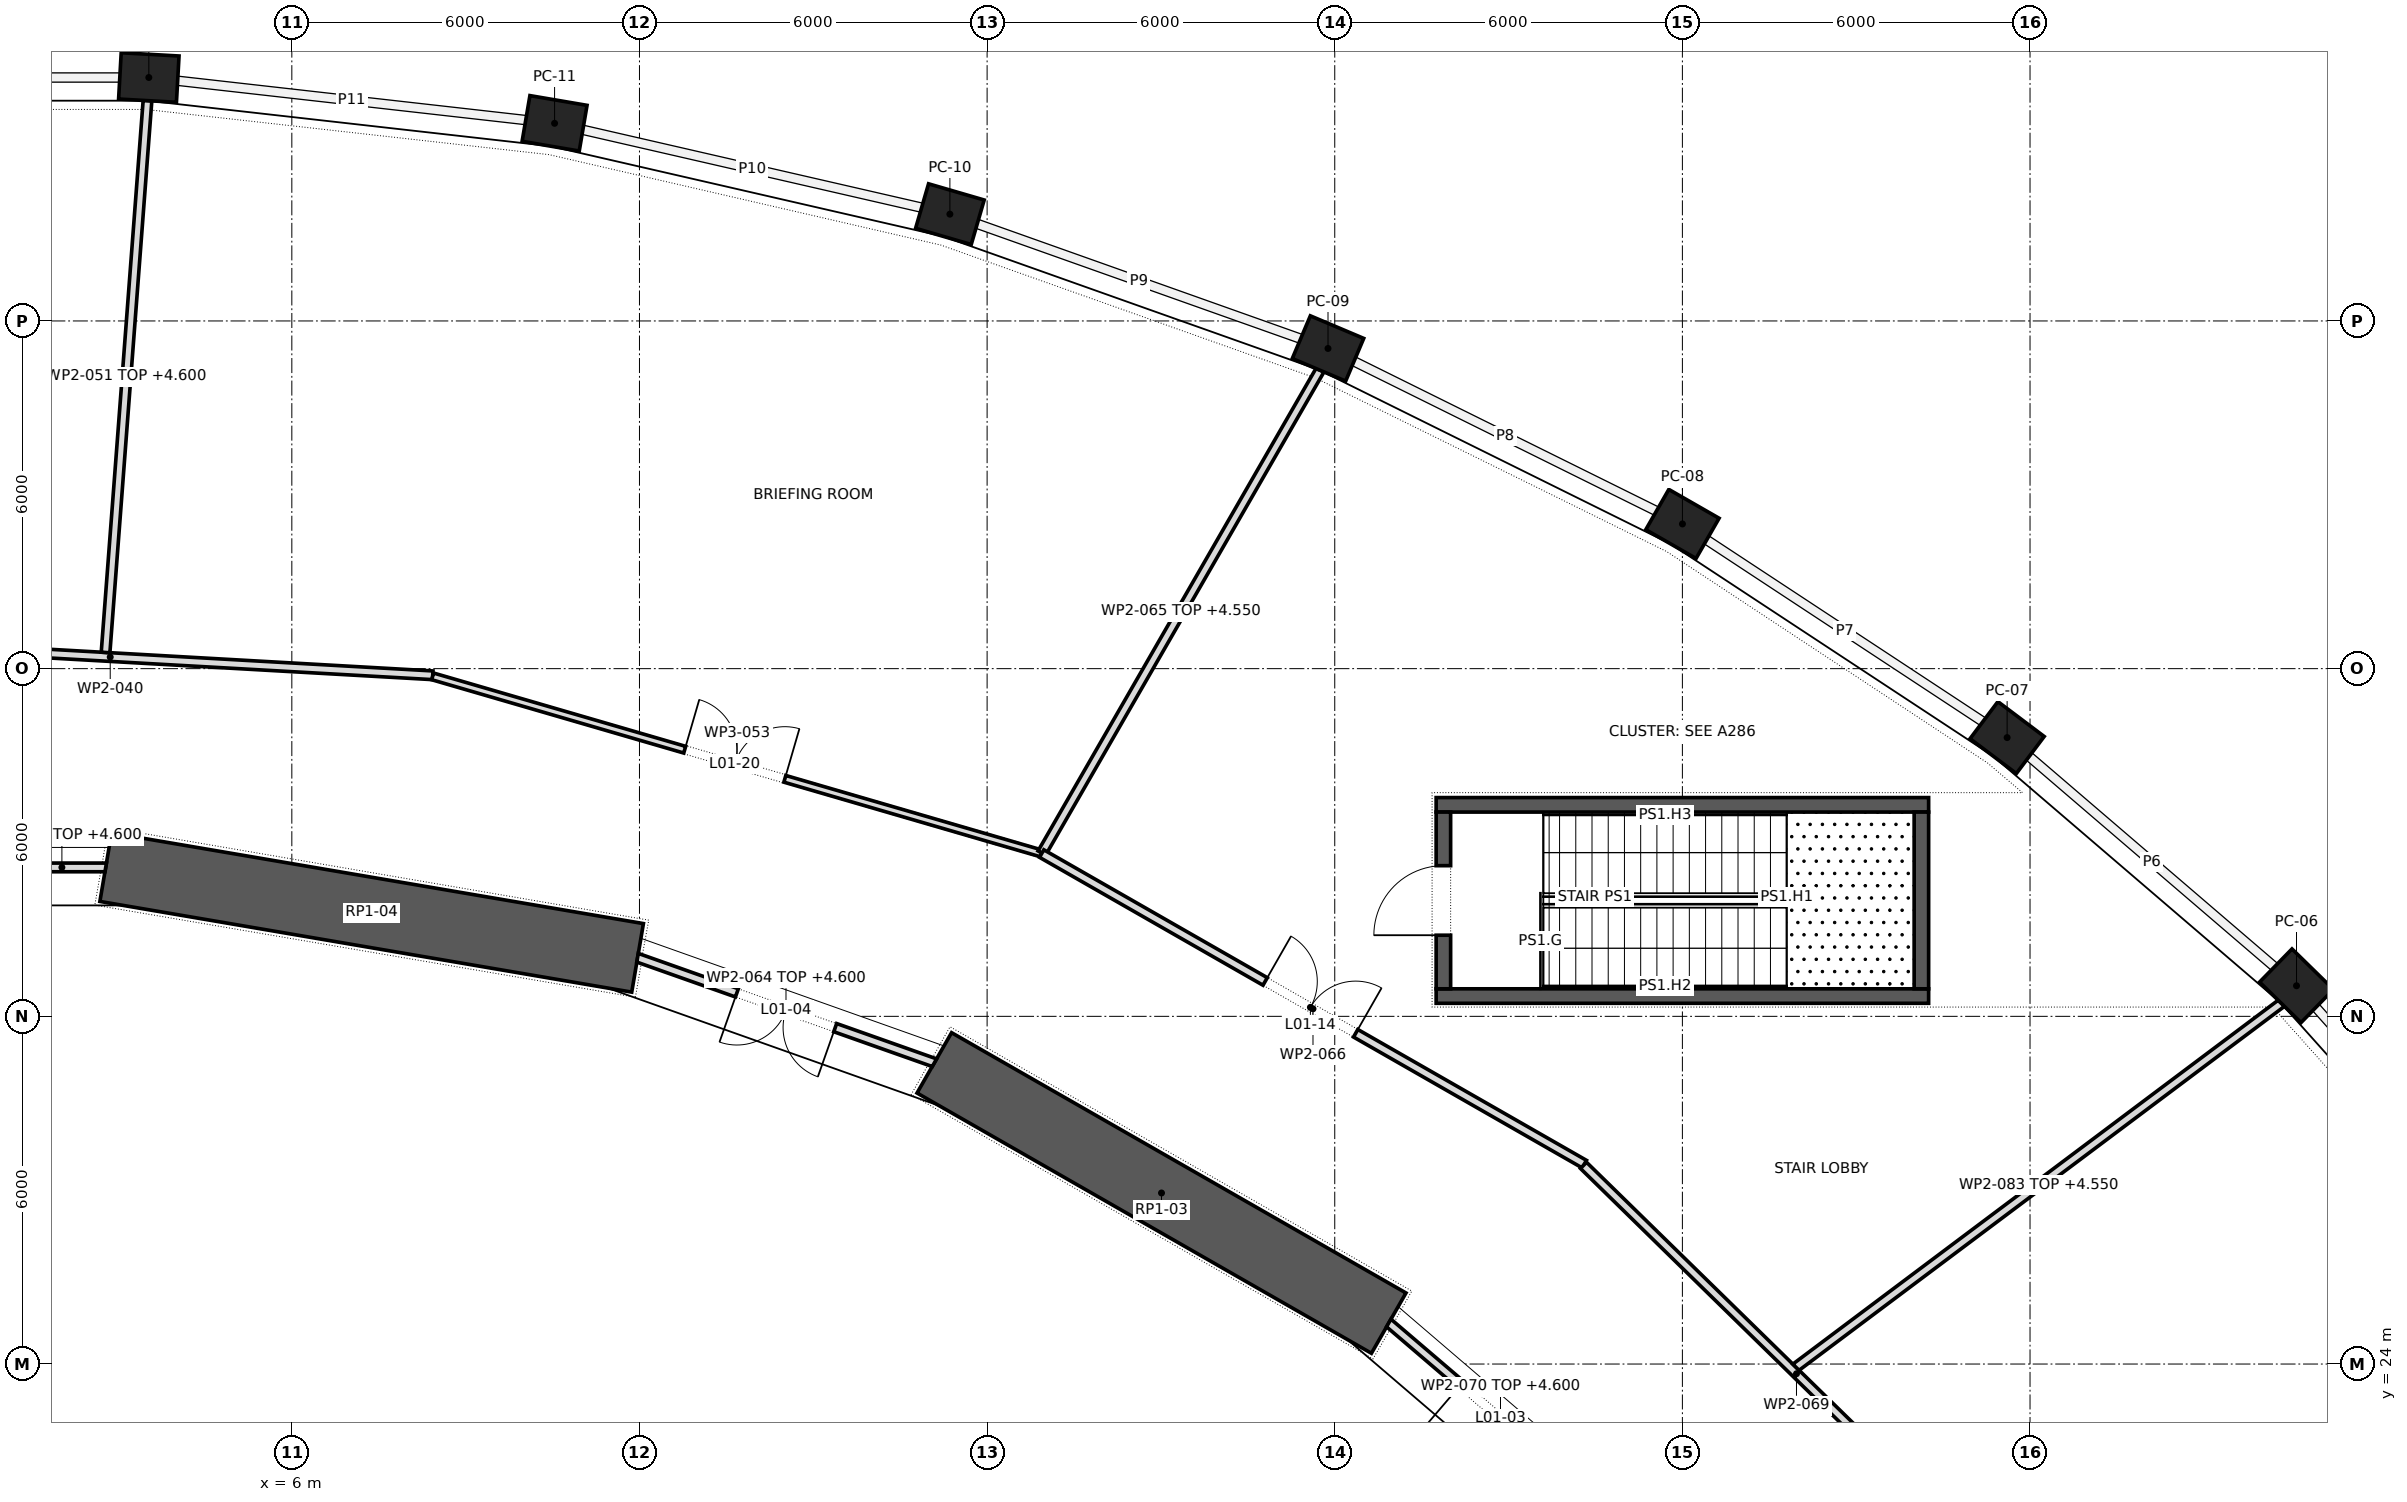
"""IFC4 building model, lengths in metres.
Left out: names, types, materials, properties, quantities, classifications, styles, units other than length and angle.
Written with IfcOpenShell. Run it as: python <this file> out.ifc"""

import sys

from ifc_helpers import new_model, si_unit, direction, frame, frame_2d, origin, origin_2d, place, context, subcontext, project, spatial, polyline, rectangle, outline, extrude, element, fill, save


model = new_model("IFC4")
c1 = context("Model", 3, precision=1e-05, world=origin(), true_north=direction((0.0, 1.0)))
c2 = subcontext(c1, "Body", "Model", "MODEL_VIEW")
j1 = project(units=[si_unit("LENGTHUNIT", "METRE"), si_unit("PLANEANGLEUNIT", "RADIAN")], contexts=[c1])
p1 = place(None, origin())
s1 = spatial("IfcSite", under=j1, at=p1, CompositionType="ELEMENT")
p2 = place(p1, origin())
s2 = spatial("IfcBuilding", under=s1, at=p2, CompositionType="ELEMENT")
p3 = place(p2, frame((0.0, 0.0, 7.0)))
s3 = spatial("IfcBuildingStorey", under=s2, at=p3, CompositionType="ELEMENT", Elevation=7.0)
for number, where, z_axis, x_axis in (
    (1, (40.599, 30.528, 0.0), (0.0, 0.0, 1.0), (-0.715, 0.699, 0.0)),
    (2, (35.605, 34.81, 0.0), (0.0, 0.0, 1.0), (-0.799, 0.601, 0.0)),
    (3, (30.001, 38.497, 0.0), (0.0, 0.0, 1.0), (-0.868, 0.497, 0.0)),
    (4, (23.884, 41.525, 0.0), (0.0, 0.0, 1.0), (-0.921, 0.389, 0.0)),
    (5, (17.358, 43.843, 0.0), (0.0, 0.0, 1.0), (-0.96, 0.279, 0.0)),
    (6, (10.535, 45.41, 0.0), (0.0, 0.0, 1.0), (-0.986, 0.168, 0.0)),
    (7, (3.532, 46.201, 0.0), (0.0, 0.0, 1.0), (-0.998, 0.056, 0.0)),
):
    element("IfcColumn", number, at=place(p3, frame(where, z_axis=z_axis, x_axis=x_axis)), inside=s3, PredefinedType="COLUMN", context=c2, shape_type="SweptSolid", body=[
        extrude(rectangle(XDim=1.0, YDim=0.8, at=origin_2d()), origin(), (0.0, 0.0, 1.0), 5.5),
    ])
p4 = place(p3, frame((24.931, 24.706, 0.0), z_axis=(0.0, 0.0, 1.0), x_axis=(-0.867760656864, 0.496982336103, 0.0)))
e8 = element("IfcWall", 8, at=p4, inside=s3, PredefinedType="SHEAR", context=c2, shape_type="SweptSolid", body=[
    extrude(rectangle(XDim=9.038, YDim=1.2, at=frame_2d((4.519, 0.0))), origin(), (0.0, 0.0, 1.0), 5.5),
])
p5 = place(p3, frame((11.967, 31.009, 0.0), z_axis=(0.0, 0.0, 1.0), x_axis=(-0.985776286846, 0.168062822456, 0.0)))
e9 = element("IfcWall", 9, at=p5, inside=s3, PredefinedType="SHEAR", context=c2, shape_type="SweptSolid", body=[
    extrude(rectangle(XDim=9.312, YDim=1.2, at=frame_2d((4.656, 0.0))), origin(), (0.0, 0.0, 1.0), 5.5),
])
for number, where, z_axis, x_axis in (
    (10, (25.75, 33.65, 0.0), (0.0, 0.0, 1.0), (1.0, 0.0, 0.0)),
    (11, (25.75, 30.35, 0.0), (0.0, 0.0, 1.0), (1.0, 0.0, 0.0)),
):
    element("IfcWall", number, at=place(p3, frame(where, z_axis=z_axis, x_axis=x_axis)), inside=s3, PredefinedType="SHEAR", context=c2, shape_type="SweptSolid", body=[
        extrude(rectangle(XDim=8.5, YDim=0.25, at=frame_2d((4.25, 0.0))), origin(), (0.0, 0.0, 1.0), 5.15),
    ])
p6 = place(p3, frame((25.875, 30.475, 0.0), z_axis=(0.0, 0.0, 1.0), x_axis=(0.0, 1.0, 0.0)))
e12 = element("IfcWall", 12, at=p6, inside=s3, PredefinedType="SHEAR", context=c2, shape_type="SweptSolid", body=[
    extrude(rectangle(XDim=3.05, YDim=0.25, at=frame_2d((1.525, 0.0))), origin(), (0.0, 0.0, 1.0), 5.15),
])
p7 = place(p6, frame((0.925, 0.0, 0.0)))
e13 = element("IfcOpeningElement", 13, at=p7, cuts=e12, PredefinedType="OPENING", context=c2, shape_type="SweptSolid", body=[
    extrude(rectangle(XDim=1.2, YDim=2.1, at=frame_2d((0.6, 1.05))), frame((0.0, 0.137, 0.0), z_axis=(0.0, -1.0, 0.0), x_axis=(1.0, 0.0, 0.0)), (0.0, 0.0, 1.0), 0.274),
])
p8 = place(p3, frame((34.125, 30.475, 0.0), z_axis=(0.0, 0.0, 1.0), x_axis=(0.0, 1.0, 0.0)))
e14 = element("IfcWall", 14, at=p8, inside=s3, PredefinedType="SHEAR", context=c2, shape_type="SweptSolid", body=[
    extrude(rectangle(XDim=3.05, YDim=0.25, at=frame_2d((1.525, 0.0))), origin(), (0.0, 0.0, 1.0), 5.15),
])
p9 = place(p3, frame((-2.701, 36.514, 0.0), z_axis=(0.0, 0.0, 1.0), x_axis=(0.998408109845, -0.056402537138, 0.0)))
e15 = element("IfcWall", 15, at=p9, inside=s3, PredefinedType="PARTITIONING", context=c2, shape_type="SweptSolid", body=[
    extrude(rectangle(XDim=11.15, YDim=0.15, at=frame_2d((5.575, 0.0))), origin(), (0.0, 0.0, 1.0), 5.15),
])
p10 = place(p3, frame((2.785, 36.279, 0.0), z_axis=(0.0, 0.0, 1.0), x_axis=(0.075764074647, 0.997125771903, 0.0)))
e16 = element("IfcWall", 16, at=p10, inside=s3, PredefinedType="PARTITIONING", context=c2, shape_type="SweptSolid", body=[
    extrude(rectangle(XDim=9.551, YDim=0.15, at=frame_2d((4.775, 0.0))), origin(), (0.0, 0.0, 1.0), 4.6),
])
p11 = place(p3, frame((2.788, 32.57, 0.0), z_axis=(0.0, 0.0, 1.0), x_axis=(-1.0, 0.0, 0.0)))
e17 = element("IfcWall", 17, at=p11, inside=s3, PredefinedType="PARTITIONING", context=c2, shape_type="SweptSolid", body=[
    extrude(outline(polyline([(-0.013, -0.075), (1.513, -0.075), (1.513, 0.075), (0.013, 0.075), (-0.013, -0.075)])), origin(), (0.0, 0.0, 1.0), 4.6),
])
p12 = place(p3, frame((8.43, 35.867, 0.0), z_axis=(0.0, 0.0, 1.0), x_axis=(0.960213020848, -0.279268606532, 0.0)))
e18 = element("IfcWall", 18, at=p12, inside=s3, PredefinedType="PARTITIONING", context=c2, shape_type="SweptSolid", body=[
    extrude(rectangle(XDim=10.948, YDim=0.12, at=frame_2d((5.474, 0.0))), origin(), (0.0, 0.0, 1.0), 5.15),
])
p13 = place(p12, frame((4.531, 0.0, 0.0)))
e19 = element("IfcOpeningElement", 19, at=p13, cuts=e18, PredefinedType="OPENING", context=c2, shape_type="SweptSolid", body=[
    extrude(rectangle(XDim=1.8, YDim=2.1, at=frame_2d((0.9, 1.05))), frame((0.0, 0.072, 0.0), z_axis=(0.0, -1.0, 0.0), x_axis=(1.0, 0.0, 0.0)), (0.0, 0.0, 1.0), 0.144),
])
p14 = place(p3, frame((17.091, 29.2, 0.0), z_axis=(0.0, 0.0, 1.0), x_axis=(-0.942814385805, 0.333318217204, 0.0)))
e20 = element("IfcWall", 20, at=p14, inside=s3, PredefinedType="PARTITIONING", context=c2, shape_type="SweptSolid", body=[
    extrude(outline(polyline([(-0.014, -0.075), (5.448, -0.075), (5.422, 0.075), (0.014, 0.075), (-0.014, -0.075)])), origin(), (0.0, 0.0, 1.0), 4.6),
])
p15 = place(p14, frame((1.816, 0.0, 0.0)))
e21 = element("IfcOpeningElement", 21, at=p15, cuts=e20, PredefinedType="OPENING", context=c2, shape_type="SweptSolid", body=[
    extrude(rectangle(XDim=1.8, YDim=2.1, at=frame_2d((0.9, 1.05))), frame((0.0, 0.087, 0.0), z_axis=(0.0, -1.0, 0.0), x_axis=(1.0, 0.0, 0.0)), (0.0, 0.0, 1.0), 0.174),
])
p16 = place(p3, frame((18.944, 32.817, 0.0), z_axis=(0.0, 0.0, 1.0), x_axis=(0.499213998788, 0.866478726464, 0.0)))
e22 = element("IfcWall", 22, at=p16, inside=s3, PredefinedType="PARTITIONING", context=c2, shape_type="SweptSolid", body=[
    extrude(outline(polyline([(0.0, -0.075), (9.627, -0.075), (9.608, 0.075), (0.0, 0.075), (0.0, -0.075)])), origin(), (0.0, 0.0, 1.0), 4.55),
])
p17 = place(p3, frame((18.942, 32.809, 0.0), z_axis=(0.0, 0.0, 1.0), x_axis=(0.867956168909, -0.49664080466, 0.0)))
e23 = element("IfcWall", 23, at=p17, inside=s3, PredefinedType="PARTITIONING", context=c2, shape_type="SweptSolid", body=[
    extrude(rectangle(XDim=10.79, YDim=0.15, at=frame_2d((5.395, 0.0))), origin(), (0.0, 0.0, 1.0), 5.15),
])
p18 = place(p17, frame((4.444, 0.0, 0.0)))
e24 = element("IfcOpeningElement", 24, at=p18, cuts=e23, PredefinedType="OPENING", context=c2, shape_type="SweptSolid", body=[
    extrude(rectangle(XDim=1.8, YDim=2.1, at=frame_2d((0.9, 1.05))), frame((0.0, 0.087, 0.0), z_axis=(0.0, -1.0, 0.0), x_axis=(1.0, 0.0, 0.0)), (0.0, 0.0, 1.0), 0.174),
])
p19 = place(p3, frame((28.294, 27.428, 0.0), z_axis=(0.0, 0.0, 1.0), x_axis=(0.71483918539, -0.699288880958, 0.0)))
e25 = element("IfcWall", 25, at=p19, inside=s3, PredefinedType="PARTITIONING", context=c2, shape_type="SweptSolid", body=[
    extrude(rectangle(XDim=10.283, YDim=0.15, at=frame_2d((5.142, 0.0))), origin(), (0.0, 0.0, 1.0), 5.15),
])
p20 = place(p3, frame((28.789, 21.411, 0.0), z_axis=(0.0, 0.0, 1.0), x_axis=(-0.760084552743, 0.649824185978, 0.0)))
e26 = element("IfcWall", 26, at=p20, inside=s3, PredefinedType="PARTITIONING", context=c2, shape_type="SweptSolid", body=[
    extrude(outline(polyline([(-0.015, -0.075), (5.089, -0.075), (5.061, 0.075), (0.015, 0.075), (-0.015, -0.075)])), origin(), (0.0, 0.0, 1.0), 4.6),
])
p21 = place(p20, frame((1.638, 0.0, 0.0)))
e27 = element("IfcOpeningElement", 27, at=p21, cuts=e26, PredefinedType="OPENING", context=c2, shape_type="SweptSolid", body=[
    extrude(rectangle(XDim=1.8, YDim=2.1, at=frame_2d((0.9, 1.05))), frame((0.0, 0.087, 0.0), z_axis=(0.0, -1.0, 0.0), x_axis=(1.0, 0.0, 0.0)), (0.0, 0.0, 1.0), 0.174),
])
p22 = place(p3, frame((40.337, 30.226, 0.0), z_axis=(0.0, 0.0, 1.0), x_axis=(-0.800117504973, -0.599843294732, 0.0)))
e28 = element("IfcWall", 28, at=p22, inside=s3, PredefinedType="PARTITIONING", context=c2, shape_type="SweptSolid", body=[
    extrude(outline(polyline([(0.011, -0.075), (10.482, -0.075), (10.459, 0.075), (-0.011, 0.075), (0.011, -0.075)])), origin(), (0.0, 0.0, 1.0), 4.55),
])
p23 = place(p7, origin())
e29 = element("IfcDoor", 29, at=p23, inside=s3, OperationType="SINGLE_SWING_RIGHT", PredefinedType="DOOR", context=c2, shape_type="SweptSolid", body=[
    extrude(rectangle(XDim=1.2, YDim=2.1, at=frame_2d((0.6, 1.05))), frame((0.0, 0.025, 0.0), z_axis=(0.0, -1.0, 0.0), x_axis=(1.0, 0.0, 0.0)), (0.0, 0.0, 1.0), 0.05),
])
fill(e13, e29)
p24 = place(p21, origin())
e30 = element("IfcDoor", 30, at=p24, inside=s3, OperationType="DOUBLE_DOOR_SINGLE_SWING", PredefinedType="DOOR", context=c2, shape_type="SweptSolid", body=[
    extrude(rectangle(XDim=1.8, YDim=2.1, at=frame_2d((0.9, 1.05))), frame((0.0, 0.025, 0.0), z_axis=(0.0, -1.0, 0.0), x_axis=(1.0, 0.0, 0.0)), (0.0, 0.0, 1.0), 0.05),
])
fill(e27, e30)
p25 = place(p15, origin())
e31 = element("IfcDoor", 31, at=p25, inside=s3, OperationType="DOUBLE_DOOR_SINGLE_SWING", PredefinedType="DOOR", context=c2, shape_type="SweptSolid", body=[
    extrude(rectangle(XDim=1.8, YDim=2.1, at=frame_2d((0.9, 1.05))), frame((0.0, 0.025, 0.0), z_axis=(0.0, -1.0, 0.0), x_axis=(1.0, 0.0, 0.0)), (0.0, 0.0, 1.0), 0.05),
])
fill(e21, e31)
p26 = place(p18, origin())
e32 = element("IfcDoor", 32, at=p26, inside=s3, OperationType="DOUBLE_DOOR_SINGLE_SWING", PredefinedType="DOOR", context=c2, shape_type="SweptSolid", body=[
    extrude(rectangle(XDim=1.8, YDim=2.1, at=frame_2d((0.9, 1.05))), frame((0.0, 0.025, 0.0), z_axis=(0.0, -1.0, 0.0), x_axis=(1.0, 0.0, 0.0)), (0.0, 0.0, 1.0), 0.05),
])
fill(e24, e32)
p27 = place(p13, origin())
e33 = element("IfcDoor", 33, at=p27, inside=s3, OperationType="DOUBLE_DOOR_SINGLE_SWING", PredefinedType="DOOR", context=c2, shape_type="SweptSolid", body=[
    extrude(rectangle(XDim=1.8, YDim=2.1, at=frame_2d((0.9, 1.05))), frame((0.0, 0.025, 0.0), z_axis=(0.0, -1.0, 0.0), x_axis=(1.0, 0.0, 0.0)), (0.0, 0.0, 1.0), 0.05),
])
fill(e19, e33)
save(model, sys.argv[1])
